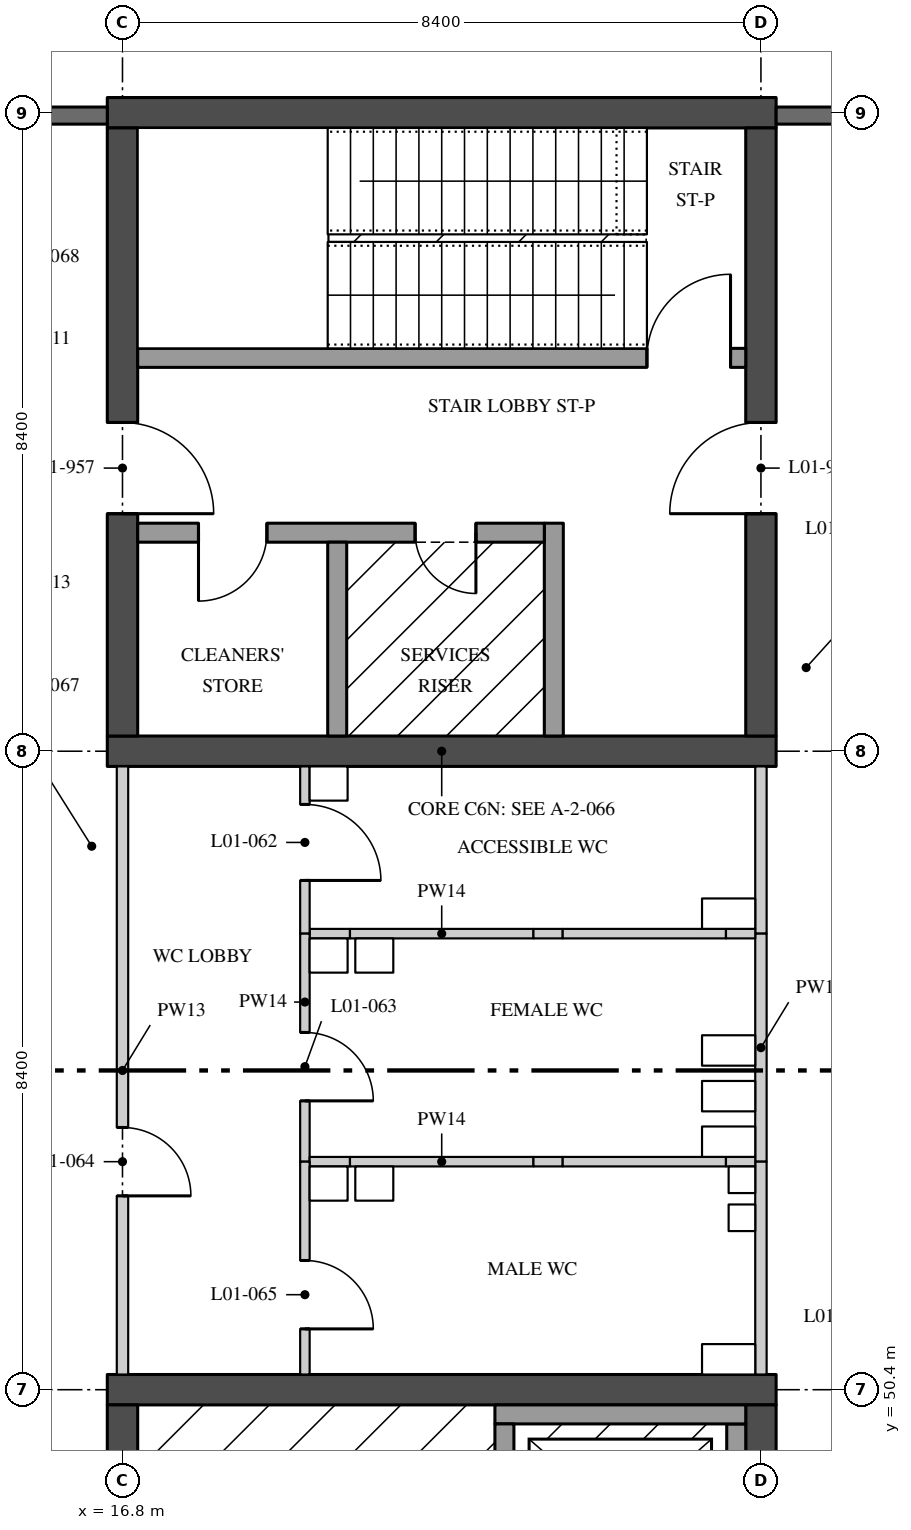
"""IFC4 building model, lengths in metres.
Left out: names, types, materials, properties, quantities, classifications, styles, units other than length and angle.
Written with IfcOpenShell. Run it as: python <this file> out.ifc"""

import sys

from ifc_helpers import new_model, si_unit, direction, frame, frame_2d, origin, place, context, subcontext, project, spatial, rectangle, extrude, element, fill, save


model = new_model("IFC4")
c1 = context("Model", 3, precision=1e-05, world=origin(), true_north=direction((0.0, 1.0)))
c2 = subcontext(c1, "Body", "Model", "MODEL_VIEW")
j1 = project(units=[si_unit("LENGTHUNIT", "METRE"), si_unit("PLANEANGLEUNIT", "RADIAN")], contexts=[c1])
p1 = place(None, origin())
s1 = spatial("IfcSite", under=j1, at=p1, CompositionType="ELEMENT")
p2 = place(p1, origin())
s2 = spatial("IfcBuilding", under=s1, at=p2, CompositionType="ELEMENT")
p3 = place(p2, frame((0.0, 0.0, 5.4)))
s3 = spatial("IfcBuildingStorey", under=s2, at=p3, CompositionType="ELEMENT", Elevation=5.4)
p4 = place(p3, frame((16.6, 50.4, 0.0), z_axis=(0.0, 0.0, 1.0), x_axis=(1.0, 0.0, 0.0)))
e1 = element("IfcWall", 1, at=p4, inside=s3, PredefinedType="SHEAR", context=c2, shape_type="SweptSolid", body=[
    extrude(rectangle(XDim=8.8, YDim=0.4, at=frame_2d((4.4, 0.0))), origin(), (0.0, 0.0, 1.0), 4.37),
])
p5 = place(p3, frame((16.8, 42.2, 0.0), z_axis=(0.0, 0.0, 1.0), x_axis=(0.0, 1.0, 0.0)))
e2 = element("IfcWall", 2, at=p5, inside=s3, PredefinedType="SHEAR", context=c2, shape_type="SweptSolid", body=[
    extrude(rectangle(XDim=8.0, YDim=0.4, at=frame_2d((4.0, 0.0))), origin(), (0.0, 0.0, 1.0), 4.37),
])
p6 = place(p5, frame((3.55, 0.0, 0.0)))
e3 = element("IfcOpeningElement", 3, at=p6, cuts=e2, PredefinedType="OPENING", context=c2, shape_type="SweptSolid", body=[
    extrude(rectangle(XDim=1.2, YDim=2.1, at=frame_2d((0.6, 1.05))), frame((0.0, 0.21, 0.0), z_axis=(0.0, -1.0, 0.0), x_axis=(1.0, 0.0, 0.0)), (0.0, 0.0, 1.0), 0.42),
])
p7 = place(p5, frame((0.8, 0.0, 0.0)))
e4 = element("IfcOpeningElement", 4, at=p7, cuts=e2, PredefinedType="OPENING", context=c2, shape_type="SweptSolid", body=[
    extrude(rectangle(XDim=1.2, YDim=2.1, at=frame_2d((0.6, 1.05))), frame((0.0, 0.21, 0.0), z_axis=(0.0, -1.0, 0.0), x_axis=(1.0, 0.0, 0.0)), (0.0, 0.0, 1.0), 0.42),
])
p8 = place(p3, frame((25.2, 42.2, 0.0), z_axis=(0.0, 0.0, 1.0), x_axis=(0.0, 1.0, 0.0)))
e5 = element("IfcWall", 5, at=p8, inside=s3, PredefinedType="SHEAR", context=c2, shape_type="SweptSolid", body=[
    extrude(rectangle(XDim=8.0, YDim=0.4, at=frame_2d((4.0, 0.0))), origin(), (0.0, 0.0, 1.0), 4.37),
])
p9 = place(p8, frame((3.55, 0.0, 0.0)))
e6 = element("IfcOpeningElement", 6, at=p9, cuts=e5, PredefinedType="OPENING", context=c2, shape_type="SweptSolid", body=[
    extrude(rectangle(XDim=1.2, YDim=2.1, at=frame_2d((0.6, 1.05))), frame((0.0, 0.21, 0.0), z_axis=(0.0, -1.0, 0.0), x_axis=(1.0, 0.0, 0.0)), (0.0, 0.0, 1.0), 0.42),
])
for number, where, z_axis, x_axis in (
    (7, (16.6, 58.8, 0.0), (0.0, 0.0, 1.0), (1.0, 0.0, 0.0)),
    (8, (16.6, 67.2, 0.0), (0.0, 0.0, 1.0), (1.0, 0.0, 0.0)),
):
    element("IfcWall", number, at=place(p3, frame(where, z_axis=z_axis, x_axis=x_axis)), inside=s3, PredefinedType="SHEAR", context=c2, shape_type="SweptSolid", body=[
        extrude(rectangle(XDim=8.8, YDim=0.4, at=frame_2d((4.4, 0.0))), origin(), (0.0, 0.0, 1.0), 4.37),
    ])
p10 = place(p3, frame((16.8, 59.0, 0.0), z_axis=(0.0, 0.0, 1.0), x_axis=(0.0, 1.0, 0.0)))
e9 = element("IfcWall", 9, at=p10, inside=s3, PredefinedType="SHEAR", context=c2, shape_type="SweptSolid", body=[
    extrude(rectangle(XDim=8.0, YDim=0.4, at=frame_2d((4.0, 0.0))), origin(), (0.0, 0.0, 1.0), 4.37),
])
p11 = place(p10, frame((2.925, 0.0, 0.0)))
e10 = element("IfcOpeningElement", 10, at=p11, cuts=e9, PredefinedType="OPENING", context=c2, shape_type="SweptSolid", body=[
    extrude(rectangle(XDim=1.2, YDim=2.1, at=frame_2d((0.6, 1.05))), frame((0.0, 0.21, 0.0), z_axis=(0.0, -1.0, 0.0), x_axis=(1.0, 0.0, 0.0)), (0.0, 0.0, 1.0), 0.42),
])
p12 = place(p3, frame((25.2, 59.0, 0.0), z_axis=(0.0, 0.0, 1.0), x_axis=(0.0, 1.0, 0.0)))
e11 = element("IfcWall", 11, at=p12, inside=s3, PredefinedType="SHEAR", context=c2, shape_type="SweptSolid", body=[
    extrude(rectangle(XDim=8.0, YDim=0.4, at=frame_2d((4.0, 0.0))), origin(), (0.0, 0.0, 1.0), 4.37),
])
p13 = place(p12, frame((2.925, 0.0, 0.0)))
e12 = element("IfcOpeningElement", 12, at=p13, cuts=e11, PredefinedType="OPENING", context=c2, shape_type="SweptSolid", body=[
    extrude(rectangle(XDim=1.2, YDim=2.1, at=frame_2d((0.6, 1.05))), frame((0.0, 0.21, 0.0), z_axis=(0.0, -1.0, 0.0), x_axis=(1.0, 0.0, 0.0)), (0.0, 0.0, 1.0), 0.42),
])
p14 = place(p3, frame((25.0, 63.975, 0.0), z_axis=(0.0, 0.0, 1.0), x_axis=(-1.0, 0.0, 0.0)))
e13 = element("IfcWall", 13, at=p14, inside=s3, PredefinedType="SOLIDWALL", context=c2, shape_type="SweptSolid", body=[
    extrude(rectangle(XDim=8.0, YDim=0.25, at=frame_2d((4.0, 0.0))), origin(), (0.0, 0.0, 1.0), 4.37),
])
p15 = place(p14, frame((0.2, 0.0, 0.0)))
e14 = element("IfcOpeningElement", 14, at=p15, cuts=e13, PredefinedType="OPENING", context=c2, shape_type="SweptSolid", body=[
    extrude(rectangle(XDim=1.1, YDim=2.1, at=frame_2d((0.55, 1.05))), frame((0.0, 0.135, 0.0), z_axis=(0.0, -1.0, 0.0), x_axis=(1.0, 0.0, 0.0)), (0.0, 0.0, 1.0), 0.27),
])
p16 = place(p3, frame((22.475, 61.8, 0.0), z_axis=(0.0, 0.0, 1.0), x_axis=(0.0, -1.0, 0.0)))
e15 = element("IfcWall", 15, at=p16, inside=s3, PredefinedType="SOLIDWALL", context=c2, shape_type="SweptSolid", body=[
    extrude(rectangle(XDim=2.8, YDim=0.25, at=frame_2d((1.4, 0.0))), origin(), (0.0, 0.0, 1.0), 4.37),
])
p17 = place(p3, frame((22.35, 61.675, 0.0), z_axis=(0.0, 0.0, 1.0), x_axis=(-1.0, 0.0, 0.0)))
e16 = element("IfcWall", 16, at=p17, inside=s3, PredefinedType="SOLIDWALL", context=c2, shape_type="SweptSolid", body=[
    extrude(rectangle(XDim=5.35, YDim=0.25, at=frame_2d((2.675, 0.0))), origin(), (0.0, 0.0, 1.0), 4.37),
])
p18 = place(p17, frame((3.65, 0.0, 0.0)))
e17 = element("IfcOpeningElement", 17, at=p18, cuts=e16, PredefinedType="OPENING", context=c2, shape_type="SweptSolid", body=[
    extrude(rectangle(XDim=0.9, YDim=2.1, at=frame_2d((0.45, 1.05))), frame((0.0, 0.135, 0.0), z_axis=(0.0, -1.0, 0.0), x_axis=(1.0, 0.0, 0.0)), (0.0, 0.0, 1.0), 0.27),
])
p19 = place(p17, frame((0.9, 0.0, 0.0)))
e18 = element("IfcOpeningElement", 18, at=p19, cuts=e16, PredefinedType="OPENING", context=c2, shape_type="SweptSolid", body=[
    extrude(rectangle(XDim=0.8, YDim=2.1, at=frame_2d((0.4, 1.05))), frame((0.0, 0.135, 0.0), z_axis=(0.0, -1.0, 0.0), x_axis=(1.0, 0.0, 0.0)), (0.0, 0.0, 1.0), 0.27),
])
p20 = place(p3, frame((19.625, 61.55, 0.0), z_axis=(0.0, 0.0, 1.0), x_axis=(0.0, -1.0, 0.0)))
e19 = element("IfcWall", 19, at=p20, inside=s3, PredefinedType="SOLIDWALL", context=c2, shape_type="SweptSolid", body=[
    extrude(rectangle(XDim=2.55, YDim=0.25, at=frame_2d((1.275, 0.0))), origin(), (0.0, 0.0, 1.0), 4.37),
])
p21 = place(p3, frame((24.875, 47.65, 0.0), z_axis=(0.0, 0.0, 1.0), x_axis=(0.0, 1.0, 0.0)))
e20 = element("IfcWall", 20, at=p21, inside=s3, PredefinedType="SOLIDWALL", context=c2, shape_type="SweptSolid", body=[
    extrude(rectangle(XDim=2.3, YDim=0.25, at=frame_2d((1.15, 0.0))), origin(), (0.0, 0.0, 1.0), 4.37),
])
p22 = place(p3, frame((21.7, 50.075, 0.0), z_axis=(0.0, 0.0, 1.0), x_axis=(1.0, 0.0, 0.0)))
e21 = element("IfcWall", 21, at=p22, inside=s3, PredefinedType="SOLIDWALL", context=c2, shape_type="SweptSolid", body=[
    extrude(rectangle(XDim=3.3, YDim=0.25, at=frame_2d((1.65, 0.0))), origin(), (0.0, 0.0, 1.0), 4.37),
])
p23 = place(p3, frame((21.825, 47.65, 0.0), z_axis=(0.0, 0.0, 1.0), x_axis=(0.0, 1.0, 0.0)))
e22 = element("IfcWall", 22, at=p23, inside=s3, PredefinedType="SOLIDWALL", context=c2, shape_type="SweptSolid", body=[
    extrude(rectangle(XDim=2.3, YDim=0.25, at=frame_2d((1.15, 0.0))), origin(), (0.0, 0.0, 1.0), 4.37),
])
p24 = place(p3, frame((25.2, 56.4, 0.0), z_axis=(0.0, 0.0, 1.0), x_axis=(0.0, 1.0, 0.0)))
e23 = element("IfcWall", 23, at=p24, inside=s3, PredefinedType="PARTITIONING", context=c2, shape_type="SweptSolid", body=[
    extrude(rectangle(XDim=2.2, YDim=0.15, at=frame_2d((1.1, 0.0))), origin(), (0.0, 0.0, 1.0), 3.746),
])
p25 = place(p3, frame((25.2, 53.4, 0.0), z_axis=(0.0, 0.0, 1.0), x_axis=(0.0, 1.0, 0.0)))
e24 = element("IfcWall", 24, at=p25, inside=s3, PredefinedType="PARTITIONING", context=c2, shape_type="SweptSolid", body=[
    extrude(rectangle(XDim=3.0, YDim=0.15, at=frame_2d((1.5, 0.0))), origin(), (0.0, 0.0, 1.0), 3.746),
])
p26 = place(p3, frame((25.2, 50.6, 0.0), z_axis=(0.0, 0.0, 1.0), x_axis=(0.0, 1.0, 0.0)))
e25 = element("IfcWall", 25, at=p26, inside=s3, PredefinedType="PARTITIONING", context=c2, shape_type="SweptSolid", body=[
    extrude(rectangle(XDim=2.8, YDim=0.15, at=frame_2d((1.4, 0.0))), origin(), (0.0, 0.0, 1.0), 3.746),
])
p27 = place(p3, frame((16.8, 50.6, 0.0), z_axis=(0.0, 0.0, 1.0), x_axis=(0.0, 1.0, 0.0)))
e26 = element("IfcWall", 26, at=p27, inside=s3, PredefinedType="PARTITIONING", context=c2, shape_type="SweptSolid", body=[
    extrude(rectangle(XDim=8.0, YDim=0.15, at=frame_2d((4.0, 0.0))), origin(), (0.0, 0.0, 1.0), 3.746),
])
p28 = place(p27, frame((2.35, 0.0, 0.0)))
e27 = element("IfcOpeningElement", 27, at=p28, cuts=e26, PredefinedType="OPENING", context=c2, shape_type="SweptSolid", body=[
    extrude(rectangle(XDim=0.9, YDim=2.1, at=frame_2d((0.45, 1.05))), frame((0.0, 0.085, 0.0), z_axis=(0.0, -1.0, 0.0), x_axis=(1.0, 0.0, 0.0)), (0.0, 0.0, 1.0), 0.17),
])
p29 = place(p3, frame((19.262, 56.4, 0.0), z_axis=(0.0, 0.0, 1.0), x_axis=(1.0, 0.0, 0.0)))
e28 = element("IfcWall", 28, at=p29, inside=s3, PredefinedType="PARTITIONING", context=c2, shape_type="SweptSolid", body=[
    extrude(rectangle(XDim=0.531, YDim=0.125, at=frame_2d((0.266, 0.0))), origin(), (0.0, 0.0, 1.0), 3.895),
])
p30 = place(p3, frame((19.793, 56.4, 0.0), z_axis=(0.0, 0.0, 1.0), x_axis=(1.0, 0.0, 0.0)))
e29 = element("IfcWall", 29, at=p30, inside=s3, PredefinedType="PARTITIONING", context=c2, shape_type="SweptSolid", body=[
    extrude(rectangle(XDim=2.414, YDim=0.125, at=frame_2d((1.207, 0.0))), origin(), (0.0, 0.0, 1.0), 4.37),
])
p31 = place(p3, frame((22.207, 56.4, 0.0), z_axis=(0.0, 0.0, 1.0), x_axis=(1.0, 0.0, 0.0)))
e30 = element("IfcWall", 30, at=p31, inside=s3, PredefinedType="PARTITIONING", context=c2, shape_type="SweptSolid", body=[
    extrude(rectangle(XDim=0.385, YDim=0.125, at=frame_2d((0.192, 0.0))), origin(), (0.0, 0.0, 1.0), 3.895),
])
p32 = place(p3, frame((22.592, 56.4, 0.0), z_axis=(0.0, 0.0, 1.0), x_axis=(1.0, 0.0, 0.0)))
e31 = element("IfcWall", 31, at=p32, inside=s3, PredefinedType="PARTITIONING", context=c2, shape_type="SweptSolid", body=[
    extrude(rectangle(XDim=2.148, YDim=0.125, at=frame_2d((1.074, 0.0))), origin(), (0.0, 0.0, 1.0), 4.37),
])
p33 = place(p3, frame((24.74, 56.4, 0.0), z_axis=(0.0, 0.0, 1.0), x_axis=(1.0, 0.0, 0.0)))
e32 = element("IfcWall", 32, at=p33, inside=s3, PredefinedType="PARTITIONING", context=c2, shape_type="SweptSolid", body=[
    extrude(rectangle(XDim=0.385, YDim=0.125, at=frame_2d((0.192, 0.0))), origin(), (0.0, 0.0, 1.0), 3.746),
])
p34 = place(p3, frame((19.2, 56.4, 0.0), z_axis=(0.0, 0.0, 1.0), x_axis=(0.0, 1.0, 0.0)))
e33 = element("IfcWall", 33, at=p34, inside=s3, PredefinedType="PARTITIONING", context=c2, shape_type="SweptSolid", body=[
    extrude(rectangle(XDim=2.2, YDim=0.125, at=frame_2d((1.1, 0.0))), origin(), (0.0, 0.0, 1.0), 4.37),
])
p35 = place(p34, frame((0.7, 0.0, 0.0)))
e34 = element("IfcOpeningElement", 34, at=p35, cuts=e33, PredefinedType="OPENING", context=c2, shape_type="SweptSolid", body=[
    extrude(rectangle(XDim=1.0, YDim=2.1, at=frame_2d((0.5, 1.05))), frame((0.0, 0.073, 0.0), z_axis=(0.0, -1.0, 0.0), x_axis=(1.0, 0.0, 0.0)), (0.0, 0.0, 1.0), 0.145),
])
p36 = place(p3, frame((19.2, 53.4, 0.0), z_axis=(0.0, 0.0, 1.0), x_axis=(0.0, 1.0, 0.0)))
e35 = element("IfcWall", 35, at=p36, inside=s3, PredefinedType="PARTITIONING", context=c2, shape_type="SweptSolid", body=[
    extrude(rectangle(XDim=3.0, YDim=0.125, at=frame_2d((1.5, 0.0))), origin(), (0.0, 0.0, 1.0), 4.37),
])
p37 = place(p36, frame((0.8, 0.0, 0.0)))
e36 = element("IfcOpeningElement", 36, at=p37, cuts=e35, PredefinedType="OPENING", context=c2, shape_type="SweptSolid", body=[
    extrude(rectangle(XDim=0.9, YDim=2.1, at=frame_2d((0.45, 1.05))), frame((0.0, 0.073, 0.0), z_axis=(0.0, -1.0, 0.0), x_axis=(1.0, 0.0, 0.0)), (0.0, 0.0, 1.0), 0.145),
])
p38 = place(p3, frame((19.262, 53.4, 0.0), z_axis=(0.0, 0.0, 1.0), x_axis=(1.0, 0.0, 0.0)))
e37 = element("IfcWall", 37, at=p38, inside=s3, PredefinedType="PARTITIONING", context=c2, shape_type="SweptSolid", body=[
    extrude(rectangle(XDim=0.531, YDim=0.125, at=frame_2d((0.266, 0.0))), origin(), (0.0, 0.0, 1.0), 3.895),
])
p39 = place(p3, frame((19.793, 53.4, 0.0), z_axis=(0.0, 0.0, 1.0), x_axis=(1.0, 0.0, 0.0)))
e38 = element("IfcWall", 38, at=p39, inside=s3, PredefinedType="PARTITIONING", context=c2, shape_type="SweptSolid", body=[
    extrude(rectangle(XDim=2.414, YDim=0.125, at=frame_2d((1.207, 0.0))), origin(), (0.0, 0.0, 1.0), 4.37),
])
p40 = place(p3, frame((22.207, 53.4, 0.0), z_axis=(0.0, 0.0, 1.0), x_axis=(1.0, 0.0, 0.0)))
e39 = element("IfcWall", 39, at=p40, inside=s3, PredefinedType="PARTITIONING", context=c2, shape_type="SweptSolid", body=[
    extrude(rectangle(XDim=0.385, YDim=0.125, at=frame_2d((0.192, 0.0))), origin(), (0.0, 0.0, 1.0), 3.895),
])
p41 = place(p3, frame((22.592, 53.4, 0.0), z_axis=(0.0, 0.0, 1.0), x_axis=(1.0, 0.0, 0.0)))
e40 = element("IfcWall", 40, at=p41, inside=s3, PredefinedType="PARTITIONING", context=c2, shape_type="SweptSolid", body=[
    extrude(rectangle(XDim=2.148, YDim=0.125, at=frame_2d((1.074, 0.0))), origin(), (0.0, 0.0, 1.0), 4.37),
])
p42 = place(p3, frame((24.74, 53.4, 0.0), z_axis=(0.0, 0.0, 1.0), x_axis=(1.0, 0.0, 0.0)))
e41 = element("IfcWall", 41, at=p42, inside=s3, PredefinedType="PARTITIONING", context=c2, shape_type="SweptSolid", body=[
    extrude(rectangle(XDim=0.385, YDim=0.125, at=frame_2d((0.192, 0.0))), origin(), (0.0, 0.0, 1.0), 3.746),
])
p43 = place(p3, frame((19.2, 50.6, 0.0), z_axis=(0.0, 0.0, 1.0), x_axis=(0.0, 1.0, 0.0)))
e42 = element("IfcWall", 42, at=p43, inside=s3, PredefinedType="PARTITIONING", context=c2, shape_type="SweptSolid", body=[
    extrude(rectangle(XDim=2.8, YDim=0.125, at=frame_2d((1.4, 0.0))), origin(), (0.0, 0.0, 1.0), 4.37),
])
p44 = place(p43, frame((0.6, 0.0, 0.0)))
e43 = element("IfcOpeningElement", 43, at=p44, cuts=e42, PredefinedType="OPENING", context=c2, shape_type="SweptSolid", body=[
    extrude(rectangle(XDim=0.9, YDim=2.1, at=frame_2d((0.45, 1.05))), frame((0.0, 0.073, 0.0), z_axis=(0.0, -1.0, 0.0), x_axis=(1.0, 0.0, 0.0)), (0.0, 0.0, 1.0), 0.145),
])
p45 = place(p3, frame((33.22, 67.163, 0.0), z_axis=(0.0, 0.0, 1.0), x_axis=(-1.0, 0.0, 0.0)))
e44 = element("IfcWall", 44, at=p45, inside=s3, PredefinedType="SOLIDWALL", context=c2, shape_type="SweptSolid", body=[
    extrude(rectangle(XDim=7.82, YDim=0.225, at=frame_2d((3.91, 0.0))), origin(), (0.0, 0.0, 1.0), 3.746),
])
p46 = place(p3, frame((16.6, 67.163, 0.0), z_axis=(0.0, 0.0, 1.0), x_axis=(-1.0, 0.0, 0.0)))
e45 = element("IfcWall", 45, at=p46, inside=s3, PredefinedType="SOLIDWALL", context=c2, shape_type="SweptSolid", body=[
    extrude(rectangle(XDim=7.82, YDim=0.225, at=frame_2d((3.91, 0.0))), origin(), (0.0, 0.0, 1.0), 3.746),
])
p47 = place(p46, frame((5.2, 0.0, 1.5)))
e46 = element("IfcOpeningElement", 46, at=p47, cuts=e45, PredefinedType="OPENING", context=c2, shape_type="SweptSolid", body=[
    extrude(rectangle(XDim=1.8, YDim=0.6, at=frame_2d((0.9, 0.3))), frame((0.0, 0.123, 0.0), z_axis=(0.0, -1.0, 0.0), x_axis=(1.0, 0.0, 0.0)), (0.0, 0.0, 1.0), 0.245),
])
p48 = place(p18, origin())
e47 = element("IfcDoor", 47, at=p48, inside=s3, OperationType="SINGLE_SWING_LEFT", PredefinedType="DOOR", context=c2, shape_type="SweptSolid", body=[
    extrude(rectangle(XDim=0.9, YDim=2.1, at=frame_2d((0.45, 1.05))), frame((0.0, 0.035, 0.0), z_axis=(0.0, -1.0, 0.0), x_axis=(1.0, 0.0, 0.0)), (0.0, 0.0, 1.0), 0.07),
])
fill(e17, e47)
p49 = place(p11, frame((1.2, 0.0, 0.0), z_axis=(0.0, 0.0, 1.0), x_axis=(-1.0, 0.0, 0.0)))
e48 = element("IfcDoor", 48, at=p49, inside=s3, OperationType="SINGLE_SWING_LEFT", PredefinedType="DOOR", context=c2, shape_type="SweptSolid", body=[
    extrude(rectangle(XDim=1.2, YDim=2.1, at=frame_2d((0.6, 1.05))), frame((0.0, 0.035, 0.0), z_axis=(0.0, -1.0, 0.0), x_axis=(1.0, 0.0, 0.0)), (0.0, 0.0, 1.0), 0.07),
])
fill(e10, e48)
p50 = place(p13, origin())
e49 = element("IfcDoor", 49, at=p50, inside=s3, OperationType="SINGLE_SWING_RIGHT", PredefinedType="DOOR", context=c2, shape_type="SweptSolid", body=[
    extrude(rectangle(XDim=1.2, YDim=2.1, at=frame_2d((0.6, 1.05))), frame((0.0, 0.035, 0.0), z_axis=(0.0, -1.0, 0.0), x_axis=(1.0, 0.0, 0.0)), (0.0, 0.0, 1.0), 0.07),
])
fill(e12, e49)
p51 = place(p19, origin())
e50 = element("IfcDoor", 50, at=p51, inside=s3, OperationType="SINGLE_SWING_RIGHT", PredefinedType="DOOR", context=c2, shape_type="SweptSolid", body=[
    extrude(rectangle(XDim=0.8, YDim=2.1, at=frame_2d((0.4, 1.05))), frame((0.0, 0.035, 0.0), z_axis=(0.0, -1.0, 0.0), x_axis=(1.0, 0.0, 0.0)), (0.0, 0.0, 1.0), 0.07),
])
fill(e18, e50)
p52 = place(p15, frame((1.1, 0.0, 0.0), z_axis=(0.0, 0.0, 1.0), x_axis=(-1.0, 0.0, 0.0)))
e51 = element("IfcDoor", 51, at=p52, inside=s3, OperationType="SINGLE_SWING_LEFT", PredefinedType="DOOR", context=c2, shape_type="SweptSolid", body=[
    extrude(rectangle(XDim=1.1, YDim=2.1, at=frame_2d((0.55, 1.05))), frame((0.0, 0.035, 0.0), z_axis=(0.0, -1.0, 0.0), x_axis=(1.0, 0.0, 0.0)), (0.0, 0.0, 1.0), 0.07),
])
fill(e14, e51)
p53 = place(p35, frame((1.0, 0.0, 0.0), z_axis=(0.0, 0.0, 1.0), x_axis=(-1.0, 0.0, 0.0)))
e52 = element("IfcDoor", 52, at=p53, inside=s3, OperationType="SINGLE_SWING_LEFT", PredefinedType="DOOR", context=c2, shape_type="SweptSolid", body=[
    extrude(rectangle(XDim=1.0, YDim=2.1, at=frame_2d((0.5, 1.05))), frame((0.0, 0.02, 0.0), z_axis=(0.0, -1.0, 0.0), x_axis=(1.0, 0.0, 0.0)), (0.0, 0.0, 1.0), 0.04),
])
fill(e34, e52)
p54 = place(p37, frame((0.9, 0.0, 0.0), z_axis=(0.0, 0.0, 1.0), x_axis=(-1.0, 0.0, 0.0)))
e53 = element("IfcDoor", 53, at=p54, inside=s3, OperationType="SINGLE_SWING_LEFT", PredefinedType="DOOR", context=c2, shape_type="SweptSolid", body=[
    extrude(rectangle(XDim=0.9, YDim=2.1, at=frame_2d((0.45, 1.05))), frame((0.0, 0.02, 0.0), z_axis=(0.0, -1.0, 0.0), x_axis=(1.0, 0.0, 0.0)), (0.0, 0.0, 1.0), 0.04),
])
fill(e36, e53)
p55 = place(p28, frame((0.9, 0.0, 0.0), z_axis=(0.0, 0.0, 1.0), x_axis=(-1.0, 0.0, 0.0)))
e54 = element("IfcDoor", 54, at=p55, inside=s3, OperationType="SINGLE_SWING_LEFT", PredefinedType="DOOR", context=c2, shape_type="SweptSolid", body=[
    extrude(rectangle(XDim=0.9, YDim=2.1, at=frame_2d((0.45, 1.05))), frame((0.0, 0.025, 0.0), z_axis=(0.0, -1.0, 0.0), x_axis=(1.0, 0.0, 0.0)), (0.0, 0.0, 1.0), 0.05),
])
fill(e27, e54)
p56 = place(p44, frame((0.9, 0.0, 0.0), z_axis=(0.0, 0.0, 1.0), x_axis=(-1.0, 0.0, 0.0)))
e55 = element("IfcDoor", 55, at=p56, inside=s3, OperationType="SINGLE_SWING_LEFT", PredefinedType="DOOR", context=c2, shape_type="SweptSolid", body=[
    extrude(rectangle(XDim=0.9, YDim=2.1, at=frame_2d((0.45, 1.05))), frame((0.0, 0.02, 0.0), z_axis=(0.0, -1.0, 0.0), x_axis=(1.0, 0.0, 0.0)), (0.0, 0.0, 1.0), 0.04),
])
fill(e43, e55)
save(model, sys.argv[1])
